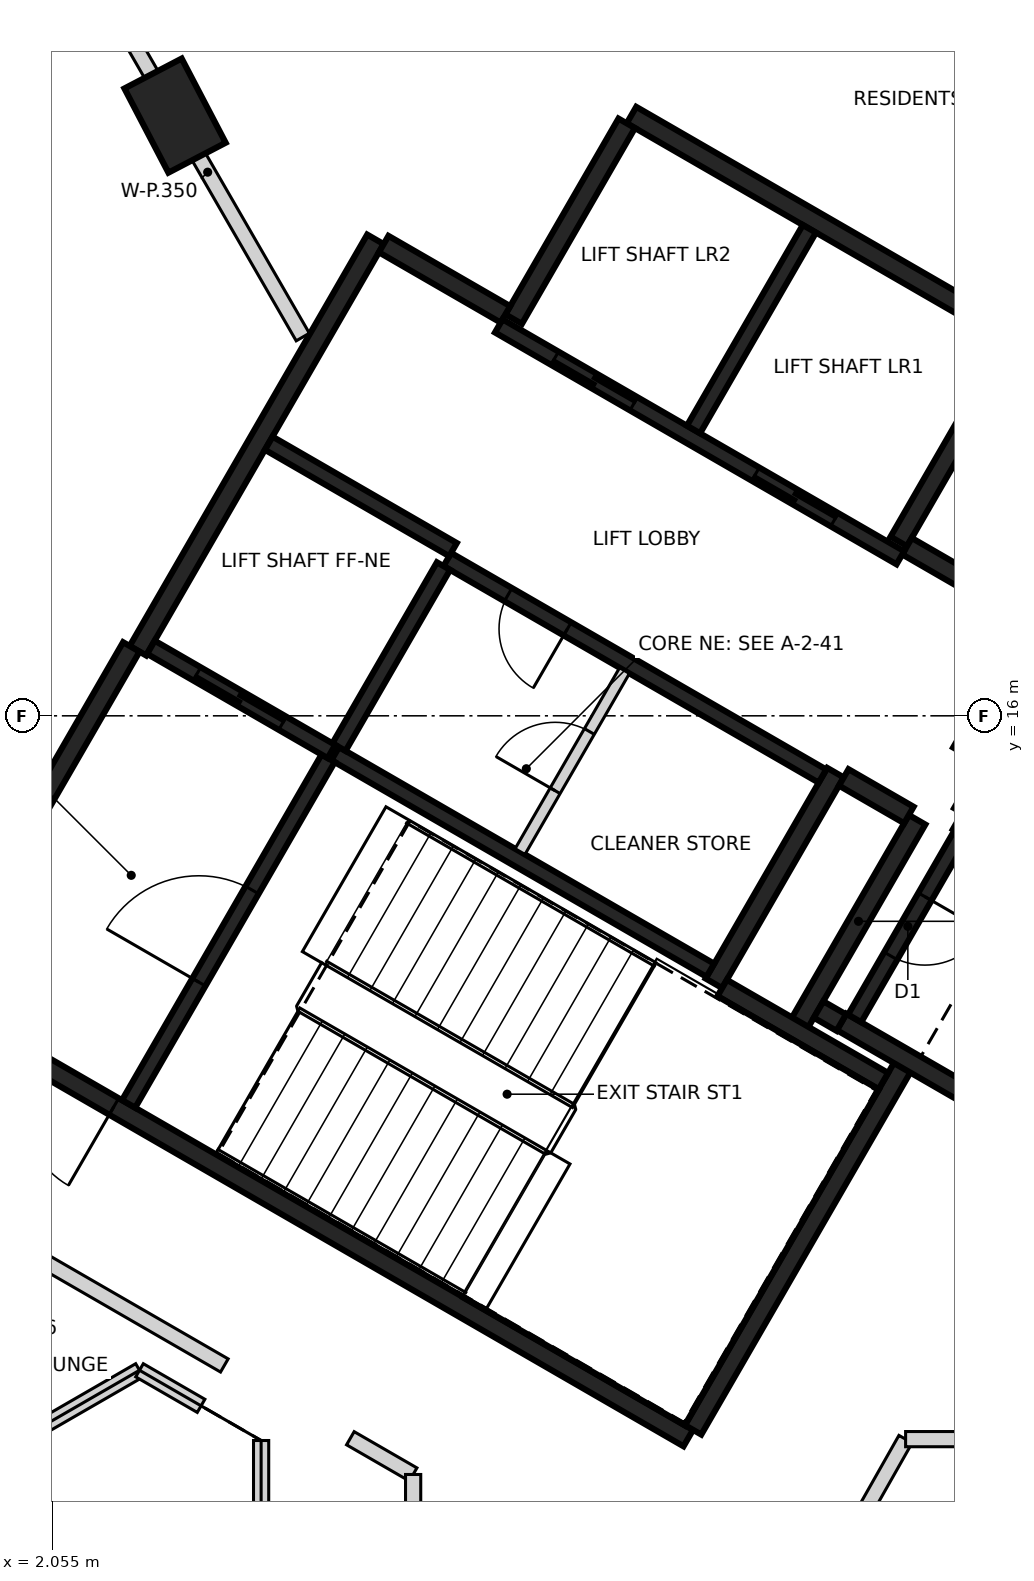
"""IFC4 building model, lengths in metres.
Left out: names, types, materials, properties, quantities, classifications, styles, units other than length and angle.
Written with IfcOpenShell. Run it as: python <this file> out.ifc"""

import sys

from ifc_helpers import new_model, si_unit, direction, frame, frame_2d, origin, origin_2d, place, context, subcontext, project, spatial, rectangle, extrude, element, fill, save


model = new_model("IFC4")
c1 = context("Model", 3, precision=1e-05, world=origin(), true_north=direction((0.0, 1.0)))
c2 = subcontext(c1, "Body", "Model", "MODEL_VIEW")
j1 = project(units=[si_unit("LENGTHUNIT", "METRE"), si_unit("PLANEANGLEUNIT", "RADIAN")], contexts=[c1])
p1 = place(None, origin())
s1 = spatial("IfcSite", under=j1, at=p1, CompositionType="ELEMENT")
p2 = place(p1, origin())
s2 = spatial("IfcBuilding", under=s1, at=p2, CompositionType="ELEMENT")
p3 = place(p2, frame((0.0, 0.0, 136.0)))
s3 = spatial("IfcBuildingStorey", under=s2, at=p3, CompositionType="ELEMENT", Elevation=136.0)
p4 = place(p3, frame((3.667, 23.896, -0.4), z_axis=(0.0, 0.0, 1.0), x_axis=(-0.463006774365, 0.886354740999, 0.0)))
e1 = element("IfcColumn", 1, at=p4, inside=s3, PredefinedType="COLUMN", context=c2, shape_type="SweptSolid", body=[
    extrude(rectangle(XDim=1.25, YDim=0.85, at=origin_2d()), origin(), (0.0, 0.0, 1.0), 3.6),
])
p5 = place(p3, frame((15.207, 26.34, -0.4), z_axis=(0.0, 0.0, 1.0), x_axis=(0.5, 0.866025403784, 0.0)))
e2 = element("IfcColumn", 2, at=p5, inside=s3, PredefinedType="COLUMN", context=c2, shape_type="SweptSolid", body=[
    extrude(rectangle(XDim=3.6, YDim=3.0, at=origin_2d()), origin(), (0.0, 0.0, 1.0), 3.6),
])
p6 = place(p3, frame((10.42, 6.498, 0.0), z_axis=(0.0, 0.0, 1.0), x_axis=(-0.866021906294, 0.500006057782, 0.0)))
e3 = element("IfcWall", 3, at=p6, inside=s3, PredefinedType="SHEAR", context=c2, shape_type="SweptSolid", body=[
    extrude(rectangle(XDim=11.55, YDim=0.25, at=frame_2d((5.775, 0.0))), origin(), (0.0, 0.0, 1.0), 3.2),
])
p7 = place(p6, frame((10.025, 0.0, 0.0)))
e4 = element("IfcOpeningElement", 4, at=p7, cuts=e3, PredefinedType="OPENING", context=c2, shape_type="SweptSolid", body=[
    extrude(rectangle(XDim=1.2, YDim=2.1, at=frame_2d((0.6, 1.05))), frame((0.0, 0.135, 0.0), z_axis=(0.0, -1.0, 0.0), x_axis=(1.0, 0.0, 0.0)), (0.0, 0.0, 1.0), 0.27),
])
p8 = place(p6, frame((8.725, 0.0, 0.0)))
e5 = element("IfcOpeningElement", 5, at=p8, cuts=e3, PredefinedType="OPENING", context=c2, shape_type="SweptSolid", body=[
    extrude(rectangle(XDim=1.2, YDim=2.1, at=frame_2d((0.6, 1.05))), frame((0.0, 0.135, 0.0), z_axis=(0.0, -1.0, 0.0), x_axis=(1.0, 0.0, 0.0)), (0.0, 0.0, 1.0), 0.27),
])
p9 = place(p3, frame((3.179, 16.856, 0.0), z_axis=(0.0, 0.0, 1.0), x_axis=(0.500004234368, 0.866022959057, 0.0)))
e6 = element("IfcWall", 6, at=p9, inside=s3, PredefinedType="SHEAR", context=c2, shape_type="SweptSolid", body=[
    extrude(rectangle(XDim=6.25, YDim=0.25, at=frame_2d((3.125, 0.0))), origin(), (0.0, 0.0, 1.0), 3.2),
])
p10 = place(p3, frame((9.673, 23.903, 0.0), z_axis=(0.0, 0.0, 1.0), x_axis=(0.86603616409, -0.499981362141, 0.0)))
e7 = element("IfcWall", 7, at=p10, inside=s3, PredefinedType="SHEAR", context=c2, shape_type="SweptSolid", body=[
    extrude(rectangle(XDim=5.85, YDim=0.25, at=frame_2d((2.925, 0.0))), origin(), (0.0, 0.0, 1.0), 3.2),
])
p11 = place(p3, frame((0.48, 12.381, 0.0), z_axis=(0.0, 0.0, 1.0), x_axis=(0.49999885962, 0.866026062182, 0.0)))
e8 = element("IfcWall", 8, at=p11, inside=s3, PredefinedType="SHEAR", context=c2, shape_type="SweptSolid", body=[
    extrude(rectangle(XDim=5.225, YDim=0.25, at=frame_2d((2.612, 0.0))), origin(), (0.0, 0.0, 1.0), 3.2),
])
p12 = place(p3, frame((13.238, 11.378, 0.0), z_axis=(0.0, 0.0, 1.0), x_axis=(-0.500008851346, -0.866020293397, 0.0)))
e9 = element("IfcWall", 9, at=p12, inside=s3, PredefinedType="SHEAR", context=c2, shape_type="SweptSolid", body=[
    extrude(rectangle(XDim=5.51, YDim=0.25, at=frame_2d((2.755, 0.0))), origin(), (0.0, 0.0, 1.0), 3.2),
])
p13 = place(p3, frame((12.357, 15.252, 0.0), z_axis=(0.0, 0.0, 1.0), x_axis=(-0.500028443584, -0.866008981251, 0.0)))
e10 = element("IfcWall", 10, at=p13, inside=s3, PredefinedType="SHEAR", context=c2, shape_type="SweptSolid", body=[
    extrude(rectangle(XDim=3.2, YDim=0.25, at=frame_2d((1.6, 0.0))), origin(), (0.0, 0.0, 1.0), 3.2),
])
for number, where, z_axis, x_axis in (
    (11, (8.123, 21.219, 0.0), (0.0, 0.0, 1.0), (0.5, 0.866, 0.0)),
    (12, (14.676, 20.87, 0.0), (0.0, 0.0, 1.0), (-0.5, -0.866, 0.0)),
):
    element("IfcWall", number, at=place(p3, frame(where, z_axis=z_axis, x_axis=x_axis)), inside=s3, PredefinedType="SHEAR", context=c2, shape_type="SweptSolid", body=[
        extrude(rectangle(XDim=2.975, YDim=0.25, at=frame_2d((1.487, 0.0))), origin(), (0.0, 0.0, 1.0), 3.2),
    ])
p14 = place(p3, frame((14.918, 10.54, 0.0), z_axis=(0.0, 0.0, 1.0), x_axis=(-0.866063538972, 0.499933942099, 0.0)))
e13 = element("IfcWall", 13, at=p14, inside=s3, PredefinedType="SHEAR", context=c2, shape_type="SweptSolid", body=[
    extrude(rectangle(XDim=2.865, YDim=0.25, at=frame_2d((1.432, 0.0))), origin(), (0.0, 0.0, 1.0), 3.2),
])
p15 = place(p3, frame((13.963, 14.614, 0.0), z_axis=(0.0, 0.0, 1.0), x_axis=(0.866042235819, -0.499970844928, 0.0)))
e14 = element("IfcWall", 14, at=p15, inside=s3, PredefinedType="SHEAR", context=c2, shape_type="SweptSolid", body=[
    extrude(rectangle(XDim=2.865, YDim=0.25, at=frame_2d((1.432, 0.0))), origin(), (0.0, 0.0, 1.0), 3.2),
])
p16 = place(p3, frame((11.888, 11.961, 0.0), z_axis=(0.0, 0.0, 1.0), x_axis=(0.500003324108, 0.866023484601, 0.0)))
e15 = element("IfcWall", 15, at=p16, inside=s3, PredefinedType="SHEAR", context=c2, shape_type="SweptSolid", body=[
    extrude(rectangle(XDim=3.085, YDim=0.25, at=frame_2d((1.542, 0.0))), origin(), (0.0, 0.0, 1.0), 3.2),
])
p17 = place(p3, frame((10.865, 12.418, 0.0), z_axis=(0.0, 0.0, 1.0), x_axis=(0.866026229868, -0.499998569178, 0.0)))
e16 = element("IfcWall", 16, at=p17, inside=s3, PredefinedType="SHEAR", context=c2, shape_type="SweptSolid", body=[
    extrude(rectangle(XDim=2.449, YDim=0.25, at=frame_2d((1.225, 0.0))), origin(), (0.0, 0.0, 1.0), 3.2),
])
p18 = place(p3, frame((13.297, 18.231, 0.0), z_axis=(0.0, 0.0, 1.0), x_axis=(0.866043531843, -0.499968599967, 0.0)))
e17 = element("IfcWall", 17, at=p18, inside=s3, PredefinedType="SHEAR", context=c2, shape_type="SweptSolid", body=[
    extrude(rectangle(XDim=1.975, YDim=0.25, at=frame_2d((0.987, 0.0))), origin(), (0.0, 0.0, 1.0), 3.2),
])
p19 = place(p3, frame((6.413, 22.206, 0.0), z_axis=(0.0, 0.0, 1.0), x_axis=(0.866016279763, -0.500015802937, 0.0)))
e18 = element("IfcWall", 18, at=p19, inside=s3, PredefinedType="SHEAR", context=c2, shape_type="SweptSolid", body=[
    extrude(rectangle(XDim=1.849, YDim=0.25, at=frame_2d((0.925, 0.0))), origin(), (0.0, 0.0, 1.0), 3.2),
])
p20 = place(p3, frame((14.945, 17.135, 0.0), z_axis=(0.0, 0.0, 1.0), x_axis=(-0.499983108224, -0.866035156036, 0.0)))
e19 = element("IfcWall", 19, at=p20, inside=s3, PredefinedType="SHEAR", context=c2, shape_type="SweptSolid", body=[
    extrude(rectangle(XDim=1.865, YDim=0.25, at=frame_2d((0.932, 0.0))), origin(), (0.0, 0.0, 1.0), 3.2),
])
p21 = place(p20, frame((0.535, 0.0, 0.0)))
e20 = element("IfcOpeningElement", 20, at=p21, cuts=e19, PredefinedType="OPENING", context=c2, shape_type="SweptSolid", body=[
    extrude(rectangle(XDim=1.25, YDim=2.1, at=frame_2d((0.625, 1.05))), frame((0.0, 0.135, 0.0), z_axis=(0.0, -1.0, 0.0), x_axis=(1.0, 0.0, 0.0)), (0.0, 0.0, 1.0), 0.27),
])
p22 = place(p3, frame((13.322, 14.695, 0.0), z_axis=(0.0, 0.0, 1.0), x_axis=(-0.866017078145, 0.500014420154, 0.0)))
e21 = element("IfcWall", 21, at=p22, inside=s3, PredefinedType="SHEAR", context=c2, shape_type="SweptSolid", body=[
    extrude(rectangle(XDim=0.989, YDim=0.25, at=frame_2d((0.495, 0.0))), origin(), (0.0, 0.0, 1.0), 3.2),
])
p23 = place(p3, frame((14.368, 15.315, 0.0), z_axis=(0.0, 0.0, 1.0), x_axis=(-0.499897359611, -0.866084655132, 0.0)))
e22 = element("IfcWall", 22, at=p23, inside=s3, PredefinedType="SHEAR", context=c2, shape_type="SweptSolid", body=[
    extrude(rectangle(XDim=0.685, YDim=0.25, at=frame_2d((0.342, 0.0))), origin(), (0.0, 0.0, 1.0), 3.2),
])
p24 = place(p3, frame((12.433, 11.964, 0.0), z_axis=(0.0, 0.0, 1.0), x_axis=(-0.866055875208, 0.499947218231, 0.0)))
e23 = element("IfcWall", 23, at=p24, inside=s3, PredefinedType="SHEAR", context=c2, shape_type="SweptSolid", body=[
    extrude(rectangle(XDim=0.345, YDim=0.25, at=frame_2d((0.172, 0.0))), origin(), (0.0, 0.0, 1.0), 3.2),
])
p25 = place(p3, frame((13.21, 18.08, 0.0), z_axis=(0.0, 0.0, 1.0), x_axis=(-0.866030299012, 0.499991521122, 0.0)))
e24 = element("IfcWall", 24, at=p25, inside=s3, PredefinedType="SHEAR", context=c2, shape_type="SweptSolid", body=[
    extrude(rectangle(XDim=6.1, YDim=0.2, at=frame_2d((3.05, 0.0))), origin(), (0.0, 0.0, 1.0), 3.2),
])
p26 = place(p25, frame((1.0, 0.0, 0.0)))
e25 = element("IfcOpeningElement", 25, at=p26, cuts=e24, PredefinedType="OPENING", context=c2, shape_type="SweptSolid", body=[
    extrude(rectangle(XDim=1.2, YDim=2.1, at=frame_2d((0.6, 1.05))), frame((0.0, 0.11, 0.0), z_axis=(0.0, -1.0, 0.0), x_axis=(1.0, 0.0, 0.0)), (0.0, 0.0, 1.0), 0.22),
])
p27 = place(p25, frame((4.05, 0.0, 0.0)))
e26 = element("IfcOpeningElement", 26, at=p27, cuts=e24, PredefinedType="OPENING", context=c2, shape_type="SweptSolid", body=[
    extrude(rectangle(XDim=1.2, YDim=2.1, at=frame_2d((0.6, 1.05))), frame((0.0, 0.11, 0.0), z_axis=(0.0, -1.0, 0.0), x_axis=(1.0, 0.0, 0.0)), (0.0, 0.0, 1.0), 0.22),
])
p28 = place(p3, frame((5.775, 15.502, 0.0), z_axis=(0.0, 0.0, 1.0), x_axis=(0.866020080793, -0.500009219579, 0.0)))
e27 = element("IfcWall", 27, at=p28, inside=s3, PredefinedType="SHEAR", context=c2, shape_type="SweptSolid", body=[
    extrude(rectangle(XDim=5.699, YDim=0.2, at=frame_2d((2.85, 0.0))), origin(), (0.0, 0.0, 1.0), 3.2),
])
p29 = place(p3, frame((12.185, 15.207, 0.0), z_axis=(0.0, 0.0, 1.0), x_axis=(-0.866020080793, 0.500009219579, 0.0)))
e28 = element("IfcWall", 28, at=p29, inside=s3, PredefinedType="SHEAR", context=c2, shape_type="SweptSolid", body=[
    extrude(rectangle(XDim=5.699, YDim=0.2, at=frame_2d((2.85, 0.0))), origin(), (0.0, 0.0, 1.0), 3.2),
])
p30 = place(p29, frame((3.874, 0.0, 0.0)))
e29 = element("IfcOpeningElement", 29, at=p30, cuts=e28, PredefinedType="OPENING", context=c2, shape_type="SweptSolid", body=[
    extrude(rectangle(XDim=0.9, YDim=2.1, at=frame_2d((0.45, 1.05))), frame((0.0, 0.11, 0.0), z_axis=(0.0, -1.0, 0.0), x_axis=(1.0, 0.0, 0.0)), (0.0, 0.0, 1.0), 0.22),
])
p31 = place(p3, frame((3.057, 10.895, 0.0), z_axis=(0.0, 0.0, 1.0), x_axis=(0.499989418164, 0.866031513124, 0.0)))
e30 = element("IfcWall", 30, at=p31, inside=s3, PredefinedType="SHEAR", context=c2, shape_type="SweptSolid", body=[
    extrude(rectangle(XDim=5.251, YDim=0.2, at=frame_2d((2.625, 0.0))), origin(), (0.0, 0.0, 1.0), 3.2),
])
p32 = place(p31, frame((1.849, 0.0, 0.0)))
e31 = element("IfcOpeningElement", 31, at=p32, cuts=e30, PredefinedType="OPENING", context=c2, shape_type="SweptSolid", body=[
    extrude(rectangle(XDim=1.4, YDim=2.1, at=frame_2d((0.7, 1.05))), frame((0.0, 0.11, 0.0), z_axis=(0.0, -1.0, 0.0), x_axis=(1.0, 0.0, 0.0)), (0.0, 0.0, 1.0), 0.22),
])
p33 = place(p3, frame((10.489, 19.767, 0.0), z_axis=(0.0, 0.0, 1.0), x_axis=(0.499946628782, 0.866056215479, 0.0)))
e32 = element("IfcWall", 32, at=p33, inside=s3, PredefinedType="SHEAR", context=c2, shape_type="SweptSolid", body=[
    extrude(rectangle(XDim=3.048, YDim=0.2, at=frame_2d((1.524, 0.0))), origin(), (0.0, 0.0, 1.0), 3.2),
])
p34 = place(p3, frame((14.008, 14.442, 0.0), z_axis=(0.0, 0.0, 1.0), x_axis=(-0.499986818241, -0.866033014143, 0.0)))
e33 = element("IfcWall", 33, at=p34, inside=s3, PredefinedType="SHEAR", context=c2, shape_type="SweptSolid", body=[
    extrude(rectangle(XDim=2.798, YDim=0.2, at=frame_2d((1.399, 0.0))), origin(), (0.0, 0.0, 1.0), 3.2),
])
p35 = place(p34, frame((0.949, 0.0, 0.0)))
e34 = element("IfcOpeningElement", 34, at=p35, cuts=e33, PredefinedType="OPENING", context=c2, shape_type="SweptSolid", body=[
    extrude(rectangle(XDim=0.9, YDim=2.1, at=frame_2d((0.45, 1.05))), frame((0.0, 0.11, 0.0), z_axis=(0.0, -1.0, 0.0), x_axis=(1.0, 0.0, 0.0)), (0.0, 0.0, 1.0), 0.22),
])
p36 = place(p3, frame((7.199, 17.97, 0.0), z_axis=(0.0, 0.0, 1.0), x_axis=(-0.499968400327, -0.866043647095, 0.0)))
e35 = element("IfcWall", 35, at=p36, inside=s3, PredefinedType="SHEAR", context=c2, shape_type="SweptSolid", body=[
    extrude(rectangle(XDim=2.75, YDim=0.2, at=frame_2d((1.375, 0.0))), origin(), (0.0, 0.0, 1.0), 3.2),
])
p37 = place(p3, frame((5.725, 15.531, 0.0), z_axis=(0.0, 0.0, 1.0), x_axis=(-0.866037306777, 0.499979382845, 0.0)))
e36 = element("IfcWall", 36, at=p37, inside=s3, PredefinedType="SHEAR", context=c2, shape_type="SweptSolid", body=[
    extrude(rectangle(XDim=2.742, YDim=0.2, at=frame_2d((1.371, 0.0))), origin(), (0.0, 0.0, 1.0), 3.2),
])
p38 = place(p37, frame((0.743, 0.0, 0.0)))
e37 = element("IfcOpeningElement", 37, at=p38, cuts=e36, PredefinedType="OPENING", context=c2, shape_type="SweptSolid", body=[
    extrude(rectangle(XDim=1.3, YDim=2.1, at=frame_2d((0.65, 1.05))), frame((0.0, 0.11, 0.0), z_axis=(0.0, -1.0, 0.0), x_axis=(1.0, 0.0, 0.0)), (0.0, 0.0, 1.0), 0.22),
])
p39 = place(p3, frame((4.901, 19.586, 0.0), z_axis=(0.0, 0.0, 1.0), x_axis=(0.866022890907, -0.500004352405, 0.0)))
e38 = element("IfcWall", 38, at=p39, inside=s3, PredefinedType="SHEAR", context=c2, shape_type="SweptSolid", body=[
    extrude(rectangle(XDim=2.799, YDim=0.2, at=frame_2d((1.399, 0.0))), origin(), (0.0, 0.0, 1.0), 3.2),
])
p40 = place(p3, frame((8.207, 14.214, 0.0), z_axis=(0.0, 0.0, 1.0), x_axis=(0.499922376475, 0.866070215109, 0.0)))
e39 = element("IfcWall", 39, at=p40, inside=s3, PredefinedType="PARTITIONING", context=c2, shape_type="SweptSolid", body=[
    extrude(rectangle(XDim=2.749, YDim=0.15, at=frame_2d((1.374, 0.0))), origin(), (0.0, 0.0, 1.0), 3.2),
])
p41 = place(p40, frame((0.924, 0.0, 0.0)))
e40 = element("IfcOpeningElement", 40, at=p41, cuts=e39, PredefinedType="OPENING", context=c2, shape_type="SweptSolid", body=[
    extrude(rectangle(XDim=0.9, YDim=2.1, at=frame_2d((0.45, 1.05))), frame((0.0, 0.085, 0.0), z_axis=(0.0, -1.0, 0.0), x_axis=(1.0, 0.0, 0.0)), (0.0, 0.0, 1.0), 0.17),
])
p42 = place(p3, frame((1.813, 8.899, 0.0), z_axis=(0.0, 0.0, 1.0), x_axis=(0.865957732194, -0.50011719232, 0.0)))
e41 = element("IfcWall", 41, at=p42, inside=s3, PredefinedType="PARTITIONING", context=c2, shape_type="SweptSolid", body=[
    extrude(rectangle(XDim=2.891, YDim=0.2, at=frame_2d((1.445, 0.0))), origin(), (0.0, 0.0, 1.0), 2.3),
])
p43 = place(p3, frame((5.974, 6.496, 0.0), z_axis=(0.0, 0.0, 1.0), x_axis=(0.865934055563, -0.500158186394, 0.0)))
e42 = element("IfcWall", 42, at=p43, inside=s3, PredefinedType="PARTITIONING", context=c2, shape_type="SweptSolid", body=[
    extrude(rectangle(XDim=0.954, YDim=0.2, at=frame_2d((0.477, 0.0))), origin(), (0.0, 0.0, 1.0), 3.2),
])
p44 = place(p3, frame((6.8, -6.019, 0.0), z_axis=(0.0, 0.0, 1.0), x_axis=(0.0, 1.0, 0.0)))
e43 = element("IfcWall", 43, at=p44, inside=s3, PredefinedType="PARTITIONING", context=c2, shape_type="SweptSolid", body=[
    extrude(rectangle(XDim=12.038, YDim=0.2, at=frame_2d((6.019, 0.0))), origin(), (0.0, 0.0, 1.0), 3.2),
])
p45 = place(p44, frame((1.485, 0.0, 0.0)))
e44 = element("IfcOpeningElement", 44, at=p45, cuts=e43, PredefinedType="OPENING", context=c2, shape_type="SweptSolid", body=[
    extrude(rectangle(XDim=0.9, YDim=2.1, at=frame_2d((0.45, 1.05))), frame((0.0, 0.11, 0.0), z_axis=(0.0, -1.0, 0.0), x_axis=(1.0, 0.0, 0.0)), (0.0, 0.0, 1.0), 0.22),
])
p46 = place(p44, frame((7.492, 0.0, 0.0)))
e45 = element("IfcOpeningElement", 45, at=p46, cuts=e43, PredefinedType="OPENING", context=c2, shape_type="SweptSolid", body=[
    extrude(rectangle(XDim=0.9, YDim=2.1, at=frame_2d((0.45, 1.05))), frame((0.0, 0.11, 0.0), z_axis=(0.0, -1.0, 0.0), x_axis=(1.0, 0.0, 0.0)), (0.0, 0.0, 1.0), 0.22),
])
p47 = place(p3, frame((12.433, 4.992, 0.0), z_axis=(0.0, 0.0, 1.0), x_axis=(0.492807777065, 0.870138204462, 0.0)))
e46 = element("IfcWall", 46, at=p47, inside=s3, PredefinedType="PARTITIONING", context=c2, shape_type="SweptSolid", body=[
    extrude(rectangle(XDim=1.715, YDim=0.2, at=frame_2d((0.857, 0.0))), origin(), (0.0, 0.0, 1.0), 3.2),
])
p48 = place(p3, frame((13.279, 6.484, 0.0), z_axis=(0.0, 0.0, 1.0), x_axis=(1.0, 0.0, 0.0)))
e47 = element("IfcWall", 47, at=p48, inside=s3, PredefinedType="PARTITIONING", context=c2, shape_type="SweptSolid", body=[
    extrude(rectangle(XDim=2.943, YDim=0.2, at=frame_2d((1.471, 0.0))), origin(), (0.0, 0.0, 1.0), 3.2),
])
p49 = place(p48, frame((0.971, 0.0, 0.0)))
e48 = element("IfcOpeningElement", 48, at=p49, cuts=e47, PredefinedType="OPENING", context=c2, shape_type="SweptSolid", body=[
    extrude(rectangle(XDim=1.0, YDim=2.1, at=frame_2d((0.5, 1.05))), frame((0.0, 0.11, 0.0), z_axis=(0.0, -1.0, 0.0), x_axis=(1.0, 0.0, 0.0)), (0.0, 0.0, 1.0), 0.22),
])
p50 = place(p3, frame((-8.0, 0.924, 0.0), z_axis=(0.0, 0.0, 1.0), x_axis=(0.86604129137, 0.499972480886, 0.0)))
e49 = element("IfcWall", 49, at=p50, inside=s3, PredefinedType="PARTITIONING", context=c2, shape_type="SweptSolid", body=[
    extrude(rectangle(XDim=12.932, YDim=0.2, at=frame_2d((6.466, 0.0))), origin(), (0.0, 0.0, 1.0), 2.3),
])
p51 = place(p3, frame((2.845, 25.321, 0.0), z_axis=(0.0, 0.0, 1.0), x_axis=(0.499730893997, -0.86618071647, 0.0)))
e50 = element("IfcWall", 50, at=p51, inside=s3, PredefinedType="PARTITIONING", context=c2, shape_type="SweptSolid", body=[
    extrude(rectangle(XDim=5.008, YDim=0.2, at=frame_2d((2.504, 0.0))), origin(), (0.0, 0.0, 1.0), 3.2),
])
p52 = place(p3, frame((3.2, 7.39, 0.0), z_axis=(0.0, 0.0, 1.0), x_axis=(0.865985641702, -0.500068863623, 0.0)))
e51 = element("IfcWall", 51, at=p52, inside=s3, PredefinedType="PARTITIONING", context=c2, shape_type="SweptSolid", body=[
    extrude(rectangle(XDim=0.935, YDim=0.2, at=frame_2d((0.468, 0.0))), origin(), (0.0, 0.0, 1.0), 2.3),
])
p53 = place(p3, frame((4.8, -6.466, 0.0), z_axis=(0.0, 0.0, 1.0), x_axis=(0.0, 1.0, 0.0)))
e52 = element("IfcWall", 52, at=p53, inside=s3, PredefinedType="PARTITIONING", context=c2, shape_type="SweptSolid", body=[
    extrude(rectangle(XDim=12.932, YDim=0.2, at=frame_2d((6.466, 0.0))), origin(), (0.0, 0.0, 1.0), 2.3),
])
p54 = place(p38, origin())
e53 = element("IfcDoor", 53, at=p54, inside=s3, OperationType="SLIDING_TO_LEFT", PredefinedType="DOOR", context=c2, shape_type="SweptSolid", body=[
    extrude(rectangle(XDim=1.3, YDim=2.1, at=frame_2d((0.65, 1.05))), frame((0.0, 0.025, 0.0), z_axis=(0.0, -1.0, 0.0), x_axis=(1.0, 0.0, 0.0)), (0.0, 0.0, 1.0), 0.05),
])
fill(e37, e53)
p55 = place(p26, origin())
e54 = element("IfcDoor", 54, at=p55, inside=s3, OperationType="DOUBLE_DOOR_SLIDING", PredefinedType="DOOR", context=c2, shape_type="SweptSolid", body=[
    extrude(rectangle(XDim=1.2, YDim=2.1, at=frame_2d((0.6, 1.05))), frame((0.0, 0.025, 0.0), z_axis=(0.0, -1.0, 0.0), x_axis=(1.0, 0.0, 0.0)), (0.0, 0.0, 1.0), 0.05),
])
fill(e25, e54)
p56 = place(p27, origin())
e55 = element("IfcDoor", 55, at=p56, inside=s3, OperationType="DOUBLE_DOOR_SLIDING", PredefinedType="DOOR", context=c2, shape_type="SweptSolid", body=[
    extrude(rectangle(XDim=1.2, YDim=2.1, at=frame_2d((0.6, 1.05))), frame((0.0, 0.025, 0.0), z_axis=(0.0, -1.0, 0.0), x_axis=(1.0, 0.0, 0.0)), (0.0, 0.0, 1.0), 0.05),
])
fill(e26, e55)
p57 = place(p8, origin())
e56 = element("IfcDoor", 56, at=p57, inside=s3, OperationType="SINGLE_SWING_RIGHT", PredefinedType="DOOR", context=c2, shape_type="SweptSolid", body=[
    extrude(rectangle(XDim=1.2, YDim=2.1, at=frame_2d((0.6, 1.05))), frame((0.0, 0.025, 0.0), z_axis=(0.0, -1.0, 0.0), x_axis=(1.0, 0.0, 0.0)), (0.0, 0.0, 1.0), 0.05),
])
fill(e5, e56)
p58 = place(p32, origin())
e57 = element("IfcDoor", 57, at=p58, inside=s3, OperationType="SINGLE_SWING_LEFT", PredefinedType="DOOR", context=c2, shape_type="SweptSolid", body=[
    extrude(rectangle(XDim=1.4, YDim=2.1, at=frame_2d((0.7, 1.05))), frame((0.0, 0.025, 0.0), z_axis=(0.0, -1.0, 0.0), x_axis=(1.0, 0.0, 0.0)), (0.0, 0.0, 1.0), 0.05),
])
fill(e31, e57)
p59 = place(p30, origin())
e58 = element("IfcDoor", 58, at=p59, inside=s3, OperationType="SINGLE_SWING_RIGHT", PredefinedType="DOOR", context=c2, shape_type="SweptSolid", body=[
    extrude(rectangle(XDim=0.9, YDim=2.1, at=frame_2d((0.45, 1.05))), frame((0.0, 0.025, 0.0), z_axis=(0.0, -1.0, 0.0), x_axis=(1.0, 0.0, 0.0)), (0.0, 0.0, 1.0), 0.05),
])
fill(e29, e58)
p60 = place(p35, origin())
e59 = element("IfcDoor", 59, at=p60, inside=s3, OperationType="SINGLE_SWING_LEFT", PredefinedType="DOOR", context=c2, shape_type="SweptSolid", body=[
    extrude(rectangle(XDim=0.9, YDim=2.1, at=frame_2d((0.45, 1.05))), frame((0.0, 0.025, 0.0), z_axis=(0.0, -1.0, 0.0), x_axis=(1.0, 0.0, 0.0)), (0.0, 0.0, 1.0), 0.05),
])
fill(e34, e59)
p61 = place(p41, origin())
e60 = element("IfcDoor", 60, at=p61, inside=s3, OperationType="SINGLE_SWING_RIGHT", PredefinedType="DOOR", context=c2, shape_type="SweptSolid", body=[
    extrude(rectangle(XDim=0.9, YDim=2.1, at=frame_2d((0.45, 1.05))), frame((0.0, 0.025, 0.0), z_axis=(0.0, -1.0, 0.0), x_axis=(1.0, 0.0, 0.0)), (0.0, 0.0, 1.0), 0.05),
])
fill(e40, e60)
save(model, sys.argv[1])
